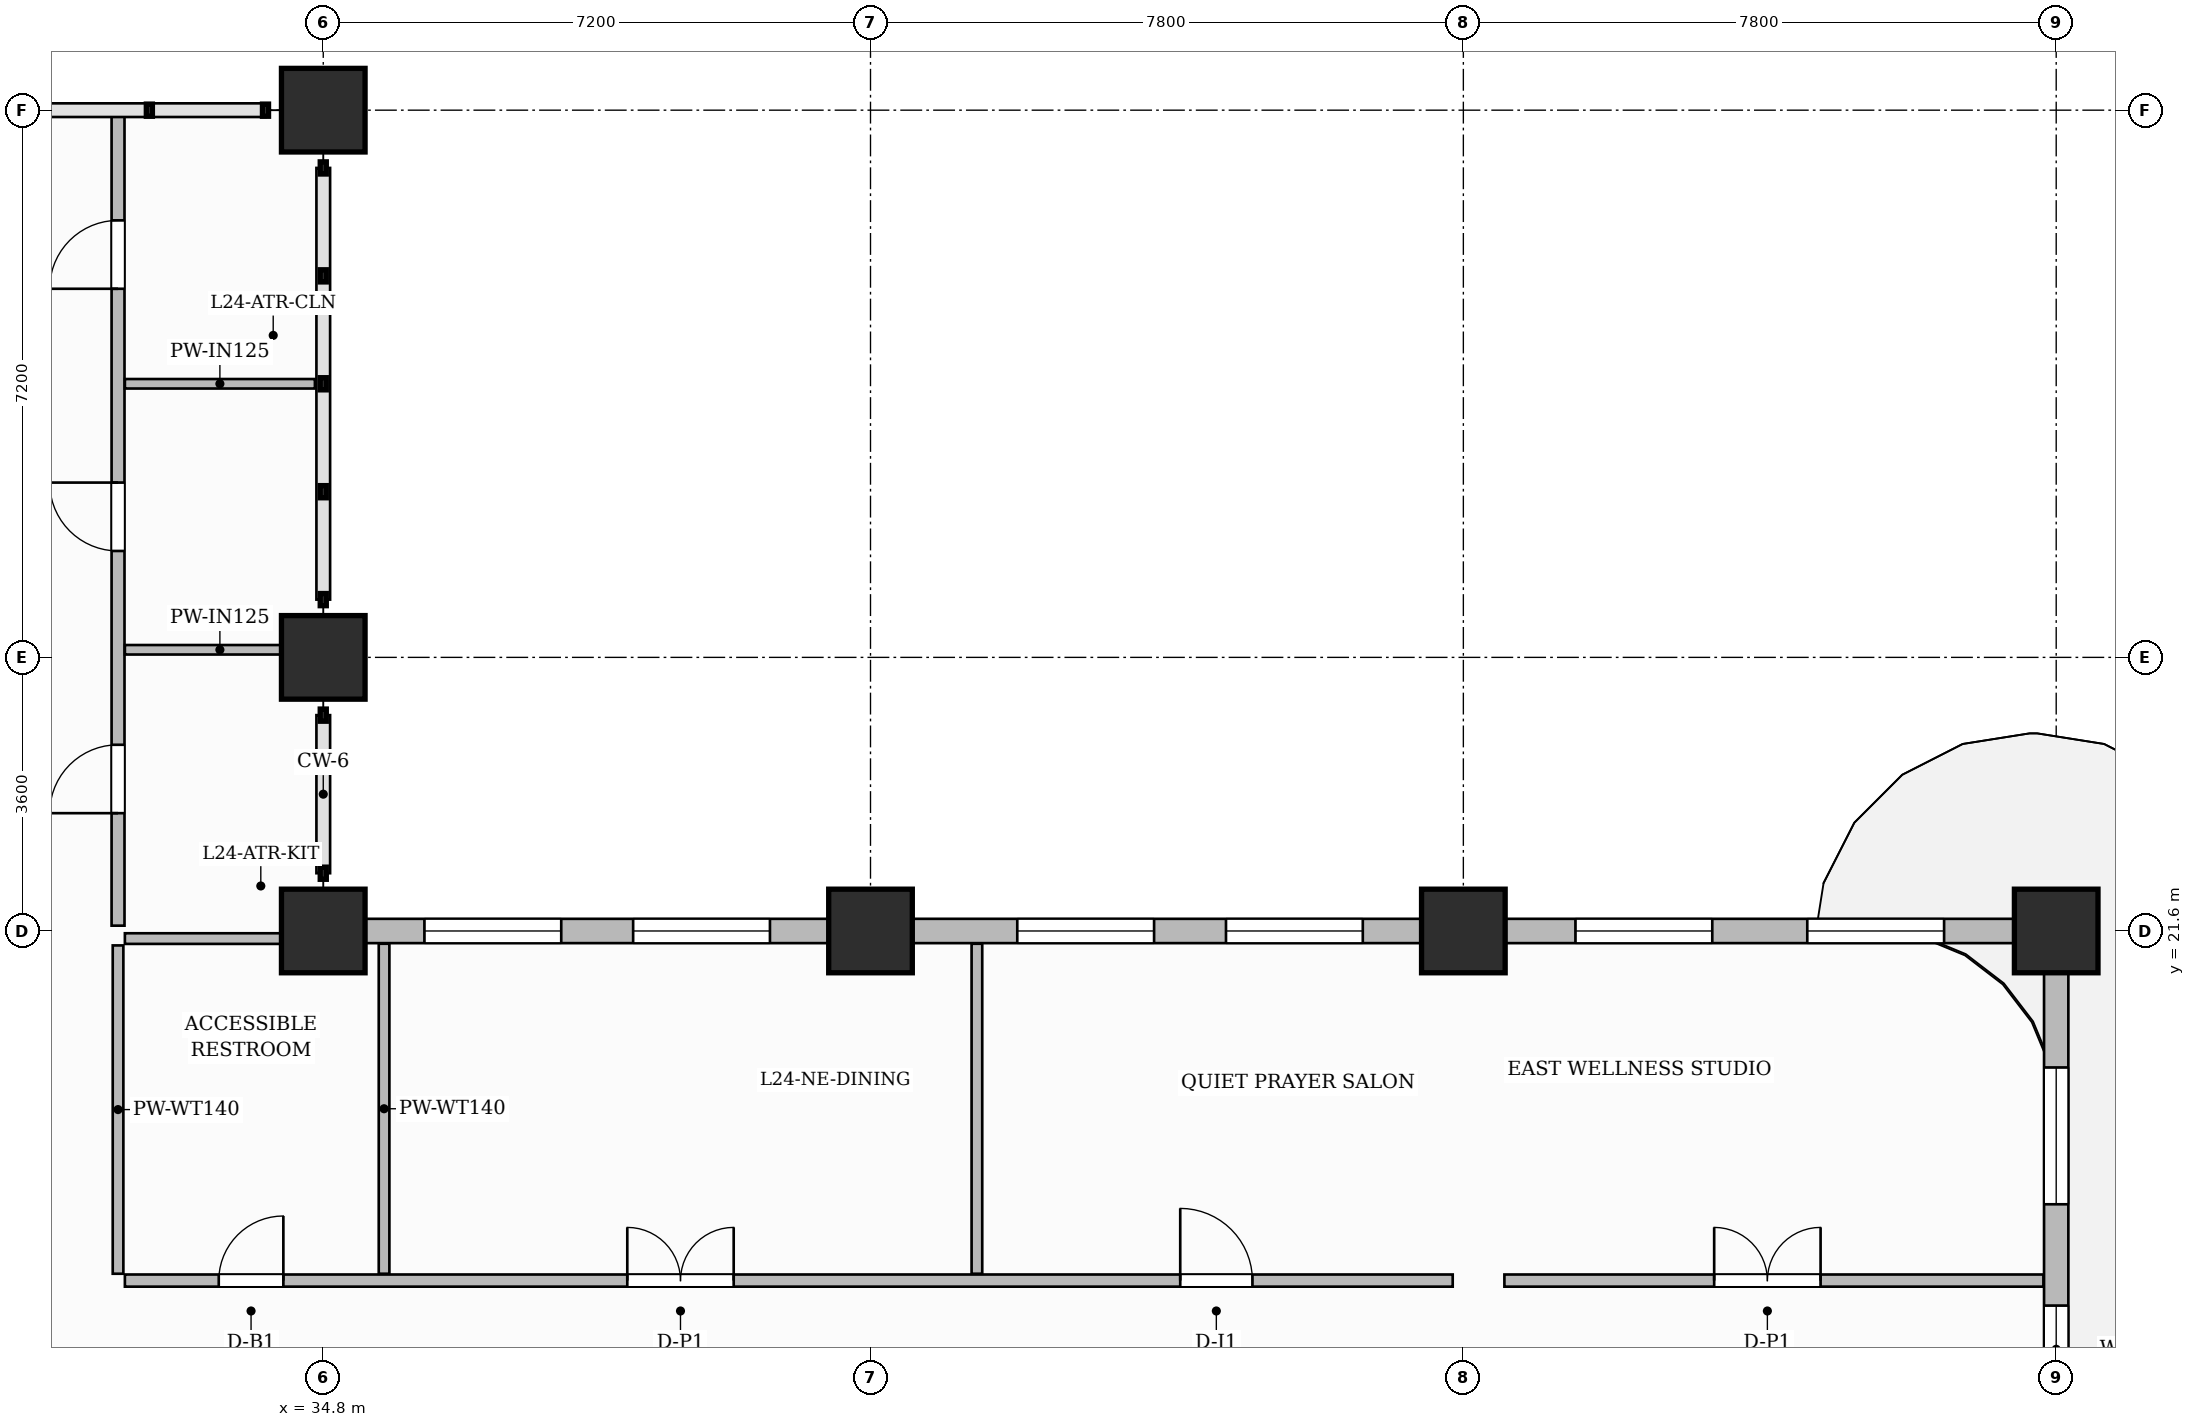
"""IFC4 building model, lengths in metres.
Left out: names, types, materials, properties, quantities, classifications, styles, units other than length and angle.
Written with IfcOpenShell. Run it as: python <this file> out.ifc"""

import sys

from ifc_helpers import new_model, si_unit, direction, frame, frame_2d, origin, origin_2d, place, context, subcontext, project, spatial, rectangle, extrude, source, transform, mapped, element, fill, save


model = new_model("IFC4")
c1 = context("Model", 3, precision=1e-05, world=origin(), true_north=direction((0.0, 1.0)))
c2 = subcontext(c1, "Body", "Model", "MODEL_VIEW")
j1 = project(units=[si_unit("LENGTHUNIT", "METRE"), si_unit("PLANEANGLEUNIT", "RADIAN")], contexts=[c1])
p1 = place(None, origin())
s1 = spatial("IfcSite", under=j1, at=p1, CompositionType="ELEMENT")
p2 = place(p1, origin())
s2 = spatial("IfcBuilding", under=s1, at=p2, CompositionType="ELEMENT")
p3 = place(p2, frame((0.0, 0.0, 99.0)))
s3 = spatial("IfcBuildingStorey", under=s2, at=p3, CompositionType="ELEMENT", Elevation=99.0)
m1 = source(origin(), c2, "Body", "SweptSolid", [
    extrude(rectangle(XDim=1.1, YDim=1.1, at=origin_2d()), origin(), (0.0, 0.0, 1.0), 3.7),
])
for number, where, z_axis, x_axis in (
    (1, (34.8, 21.6, 0.0), (0.0, 0.0, 1.0), (1.0, 0.0, 0.0)),
    (2, (34.8, 25.2, 0.0), (0.0, 0.0, 1.0), (1.0, 0.0, 0.0)),
    (3, (34.8, 32.4, 0.0), (0.0, 0.0, 1.0), (1.0, 0.0, 0.0)),
    (4, (42.0, 21.6, 0.0), (0.0, 0.0, 1.0), (1.0, 0.0, 0.0)),
    (5, (49.8, 21.6, 0.0), (0.0, 0.0, 1.0), (1.0, 0.0, 0.0)),
    (6, (57.6, 21.6, 0.0), (0.0, 0.0, 1.0), (1.0, 0.0, 0.0)),
):
    element("IfcColumn", number, at=place(p3, frame(where, z_axis=z_axis, x_axis=x_axis)), inside=s3, PredefinedType="COLUMN", context=c2, shape_type="MappedRepresentation", body=[
        mapped(m1, transform((0.0, 0.0, 0.0), scale=1.0)),
    ])
p4 = place(p3, frame((32.19, 17.0, 0.0), z_axis=(0.0, 0.0, 1.0), x_axis=(1.0, 0.0, 0.0)))
e7 = element("IfcWall", 7, at=p4, inside=s3, PredefinedType="PARTITIONING", context=c2, shape_type="SweptSolid", body=[
    extrude(rectangle(XDim=17.47, YDim=0.16, at=frame_2d((8.735, 0.0))), origin(), (0.0, 0.0, 1.0), 3.45),
])
p5 = place(p4, frame((1.235, 0.0, 0.0)))
e8 = element("IfcOpeningElement", 8, at=p5, cuts=e7, PredefinedType="OPENING", context=c2, shape_type="SweptSolid", body=[
    extrude(rectangle(XDim=0.85, YDim=2.1, at=frame_2d((0.425, 1.05))), frame((0.0, 0.09, 0.0), z_axis=(0.0, -1.0, 0.0), x_axis=(1.0, 0.0, 0.0)), (0.0, 0.0, 1.0), 0.18),
])
p6 = place(p4, frame((6.61, 0.0, 0.0)))
e9 = element("IfcOpeningElement", 9, at=p6, cuts=e7, PredefinedType="OPENING", context=c2, shape_type="SweptSolid", body=[
    extrude(rectangle(XDim=1.4, YDim=2.35, at=frame_2d((0.7, 1.175))), frame((0.0, 0.09, 0.0), z_axis=(0.0, -1.0, 0.0), x_axis=(1.0, 0.0, 0.0)), (0.0, 0.0, 1.0), 0.18),
])
p7 = place(p4, frame((13.885, 0.0, 0.0)))
e10 = element("IfcOpeningElement", 10, at=p7, cuts=e7, PredefinedType="OPENING", context=c2, shape_type="SweptSolid", body=[
    extrude(rectangle(XDim=0.95, YDim=2.15, at=frame_2d((0.475, 1.075))), frame((0.0, 0.09, 0.0), z_axis=(0.0, -1.0, 0.0), x_axis=(1.0, 0.0, 0.0)), (0.0, 0.0, 1.0), 0.18),
])
p8 = place(p3, frame((50.34, 17.0, 0.0), z_axis=(0.0, 0.0, 1.0), x_axis=(1.0, 0.0, 0.0)))
e11 = element("IfcWall", 11, at=p8, inside=s3, PredefinedType="PARTITIONING", context=c2, shape_type="SweptSolid", body=[
    extrude(rectangle(XDim=7.092, YDim=0.16, at=frame_2d((3.546, 0.0))), origin(), (0.0, 0.0, 1.0), 3.45),
])
p9 = place(p8, frame((2.76, 0.0, 0.0)))
e12 = element("IfcOpeningElement", 12, at=p9, cuts=e11, PredefinedType="OPENING", context=c2, shape_type="SweptSolid", body=[
    extrude(rectangle(XDim=1.4, YDim=2.35, at=frame_2d((0.7, 1.175))), frame((0.0, 0.09, 0.0), z_axis=(0.0, -1.0, 0.0), x_axis=(1.0, 0.0, 0.0)), (0.0, 0.0, 1.0), 0.18),
])
p10 = place(p3, frame((32.1, 17.09, 0.0), z_axis=(0.0, 0.0, 1.0), x_axis=(0.0, 1.0, 0.0)))
e13 = element("IfcWall", 13, at=p10, inside=s3, PredefinedType="PARTITIONING", context=c2, shape_type="SweptSolid", body=[
    extrude(rectangle(XDim=4.32, YDim=0.14, at=frame_2d((2.16, 0.0))), origin(), (0.0, 0.0, 1.0), 3.45),
])
for number, where, z_axis, x_axis in (
    (14, (35.6, 17.09, 0.0), (0.0, 0.0, 1.0), (0.0, 1.0, 0.0)),
    (15, (43.4, 17.09, 0.0), (0.0, 0.0, 1.0), (0.0, 1.0, 0.0)),
):
    element("IfcWall", number, at=place(p3, frame(where, z_axis=z_axis, x_axis=x_axis)), inside=s3, PredefinedType="PARTITIONING", context=c2, shape_type="SweptSolid", body=[
        extrude(rectangle(XDim=4.342, YDim=0.14, at=frame_2d((2.171, 0.0))), origin(), (0.0, 0.0, 1.0), 3.45),
    ])
p11 = place(p3, frame((32.19, 21.5, 0.0), z_axis=(0.0, 0.0, 1.0), x_axis=(1.0, 0.0, 0.0)))
e16 = element("IfcWall", 16, at=p11, inside=s3, PredefinedType="PARTITIONING", context=c2, shape_type="SweptSolid", body=[
    extrude(rectangle(XDim=2.42, YDim=0.14, at=frame_2d((1.21, 0.0))), origin(), (0.0, 0.0, 1.0), 2.885),
])
p12 = place(p3, frame((32.1, 21.67, 0.0), z_axis=(0.0, 0.0, 1.0), x_axis=(0.0, 1.0, 0.0)))
e17 = element("IfcWall", 17, at=p12, inside=s3, PredefinedType="PARTITIONING", context=c2, shape_type="SweptSolid", body=[
    extrude(rectangle(XDim=10.702, YDim=0.17, at=frame_2d((5.351, 0.0))), origin(), (0.0, 0.0, 1.0), 3.45),
])
p13 = place(p12, frame((1.48, 0.0, 0.0)))
e18 = element("IfcOpeningElement", 18, at=p13, cuts=e17, PredefinedType="OPENING", context=c2, shape_type="SweptSolid", body=[
    extrude(rectangle(XDim=0.9, YDim=2.15, at=frame_2d((0.45, 1.075))), frame((0.0, 0.095, 0.0), z_axis=(0.0, -1.0, 0.0), x_axis=(1.0, 0.0, 0.0)), (0.0, 0.0, 1.0), 0.19),
])
p14 = place(p12, frame((4.93, 0.0, 0.0)))
e19 = element("IfcOpeningElement", 19, at=p14, cuts=e17, PredefinedType="OPENING", context=c2, shape_type="SweptSolid", body=[
    extrude(rectangle(XDim=0.9, YDim=2.15, at=frame_2d((0.45, 1.075))), frame((0.0, 0.095, 0.0), z_axis=(0.0, -1.0, 0.0), x_axis=(1.0, 0.0, 0.0)), (0.0, 0.0, 1.0), 0.19),
])
p15 = place(p12, frame((8.38, 0.0, 0.0)))
e20 = element("IfcOpeningElement", 20, at=p15, cuts=e17, PredefinedType="OPENING", context=c2, shape_type="SweptSolid", body=[
    extrude(rectangle(XDim=0.9, YDim=2.15, at=frame_2d((0.45, 1.075))), frame((0.0, 0.095, 0.0), z_axis=(0.0, -1.0, 0.0), x_axis=(1.0, 0.0, 0.0)), (0.0, 0.0, 1.0), 0.19),
])
for number, where, z_axis, x_axis in (
    (21, (32.19, 25.3, 0.0), (0.0, 0.0, 1.0), (1.0, 0.0, 0.0)),
    (22, (32.19, 28.8, 0.0), (0.0, 0.0, 1.0), (1.0, 0.0, 0.0)),
):
    element("IfcWall", number, at=place(p3, frame(where, z_axis=z_axis, x_axis=x_axis)), inside=s3, PredefinedType="PARTITIONING", context=c2, shape_type="SweptSolid", body=[
        extrude(rectangle(XDim=2.5, YDim=0.125, at=frame_2d((1.25, 0.0))), origin(), (0.0, 0.0, 1.0), 3.45),
    ])
p16 = place(p3, frame((57.6, 0.05, 0.0), z_axis=(0.0, 0.0, 1.0), x_axis=(0.0, 1.0, 0.0)))
e23 = element("IfcWall", 23, at=p16, inside=s3, PredefinedType="SOLIDWALL", context=c2, shape_type="SweptSolid", body=[
    extrude(rectangle(XDim=21.5, YDim=0.32, at=frame_2d((10.75, 0.0))), origin(), (0.0, 0.0, 1.0), 2.885),
])
p17 = place(p16, frame((3.4, 0.0, 0.0)))
e24 = element("IfcOpeningElement", 24, at=p17, cuts=e23, PredefinedType="OPENING", context=c2, shape_type="SweptSolid", body=[
    extrude(rectangle(XDim=1.2, YDim=2.2, at=frame_2d((0.6, 1.1))), frame((0.0, 0.17, 0.0), z_axis=(0.0, -1.0, 0.0), x_axis=(1.0, 0.0, 0.0)), (0.0, 0.0, 1.0), 0.34),
])
p18 = place(p16, frame((1.225, 0.0, 0.8)))
e25 = element("IfcOpeningElement", 25, at=p18, cuts=e23, PredefinedType="OPENING", context=c2, shape_type="SweptSolid", body=[
    extrude(rectangle(XDim=1.4, YDim=1.85, at=frame_2d((0.7, 0.925))), frame((0.0, 0.17, 0.0), z_axis=(0.0, -1.0, 0.0), x_axis=(1.0, 0.0, 0.0)), (0.0, 0.0, 1.0), 0.34),
])
p19 = place(p16, frame((5.15, 0.0, 0.8)))
e26 = element("IfcOpeningElement", 26, at=p19, cuts=e23, PredefinedType="OPENING", context=c2, shape_type="SweptSolid", body=[
    extrude(rectangle(XDim=0.95, YDim=1.75, at=frame_2d((0.475, 0.875))), frame((0.0, 0.17, 0.0), z_axis=(0.0, -1.0, 0.0), x_axis=(1.0, 0.0, 0.0)), (0.0, 0.0, 1.0), 0.34),
])
p20 = place(p16, frame((8.475, 0.0, 0.8)))
e27 = element("IfcOpeningElement", 27, at=p20, cuts=e23, PredefinedType="OPENING", context=c2, shape_type="SweptSolid", body=[
    extrude(rectangle(XDim=1.8, YDim=1.85, at=frame_2d((0.9, 0.925))), frame((0.0, 0.17, 0.0), z_axis=(0.0, -1.0, 0.0), x_axis=(1.0, 0.0, 0.0)), (0.0, 0.0, 1.0), 0.34),
])
p21 = place(p16, frame((11.225, 0.0, 0.8)))
e28 = element("IfcOpeningElement", 28, at=p21, cuts=e23, PredefinedType="OPENING", context=c2, shape_type="SweptSolid", body=[
    extrude(rectangle(XDim=1.8, YDim=1.85, at=frame_2d((0.9, 0.925))), frame((0.0, 0.17, 0.0), z_axis=(0.0, -1.0, 0.0), x_axis=(1.0, 0.0, 0.0)), (0.0, 0.0, 1.0), 0.34),
])
p22 = place(p16, frame((15.471, 0.0, 0.8)))
e29 = element("IfcOpeningElement", 29, at=p22, cuts=e23, PredefinedType="OPENING", context=c2, shape_type="SweptSolid", body=[
    extrude(rectangle(XDim=1.15, YDim=1.8, at=frame_2d((0.575, 0.9))), frame((0.0, 0.17, 0.0), z_axis=(0.0, -1.0, 0.0), x_axis=(1.0, 0.0, 0.0)), (0.0, 0.0, 1.0), 0.34),
])
p23 = place(p16, frame((17.954, 0.0, 0.8)))
e30 = element("IfcOpeningElement", 30, at=p23, cuts=e23, PredefinedType="OPENING", context=c2, shape_type="SweptSolid", body=[
    extrude(rectangle(XDim=1.8, YDim=1.85, at=frame_2d((0.9, 0.925))), frame((0.0, 0.17, 0.0), z_axis=(0.0, -1.0, 0.0), x_axis=(1.0, 0.0, 0.0)), (0.0, 0.0, 1.0), 0.34),
])
p24 = place(p3, frame((34.8, 21.6, 0.0), z_axis=(0.0, 0.0, 1.0), x_axis=(1.0, 0.0, 0.0)))
e31 = element("IfcWall", 31, at=p24, inside=s3, PredefinedType="SOLIDWALL", context=c2, shape_type="SweptSolid", body=[
    extrude(rectangle(XDim=22.8, YDim=0.32, at=frame_2d((11.4, 0.0))), origin(), (0.0, 0.0, 1.0), 2.885),
])
p25 = place(p24, frame((1.331, 0.0, 0.8)))
e32 = element("IfcOpeningElement", 32, at=p25, cuts=e31, PredefinedType="OPENING", context=c2, shape_type="SweptSolid", body=[
    extrude(rectangle(XDim=1.8, YDim=1.85, at=frame_2d((0.9, 0.925))), frame((0.0, 0.17, 0.0), z_axis=(0.0, -1.0, 0.0), x_axis=(1.0, 0.0, 0.0)), (0.0, 0.0, 1.0), 0.34),
])
p26 = place(p24, frame((4.077, 0.0, 0.8)))
e33 = element("IfcOpeningElement", 33, at=p26, cuts=e31, PredefinedType="OPENING", context=c2, shape_type="SweptSolid", body=[
    extrude(rectangle(XDim=1.8, YDim=1.85, at=frame_2d((0.9, 0.925))), frame((0.0, 0.17, 0.0), z_axis=(0.0, -1.0, 0.0), x_axis=(1.0, 0.0, 0.0)), (0.0, 0.0, 1.0), 0.34),
])
p27 = place(p24, frame((9.131, 0.0, 0.8)))
e34 = element("IfcOpeningElement", 34, at=p27, cuts=e31, PredefinedType="OPENING", context=c2, shape_type="SweptSolid", body=[
    extrude(rectangle(XDim=1.8, YDim=1.85, at=frame_2d((0.9, 0.925))), frame((0.0, 0.17, 0.0), z_axis=(0.0, -1.0, 0.0), x_axis=(1.0, 0.0, 0.0)), (0.0, 0.0, 1.0), 0.34),
])
p28 = place(p24, frame((11.877, 0.0, 0.8)))
e35 = element("IfcOpeningElement", 35, at=p28, cuts=e31, PredefinedType="OPENING", context=c2, shape_type="SweptSolid", body=[
    extrude(rectangle(XDim=1.8, YDim=1.85, at=frame_2d((0.9, 0.925))), frame((0.0, 0.17, 0.0), z_axis=(0.0, -1.0, 0.0), x_axis=(1.0, 0.0, 0.0)), (0.0, 0.0, 1.0), 0.34),
])
p29 = place(p24, frame((16.475, 0.0, 0.8)))
e36 = element("IfcOpeningElement", 36, at=p29, cuts=e31, PredefinedType="OPENING", context=c2, shape_type="SweptSolid", body=[
    extrude(rectangle(XDim=1.8, YDim=1.85, at=frame_2d((0.9, 0.925))), frame((0.0, 0.17, 0.0), z_axis=(0.0, -1.0, 0.0), x_axis=(1.0, 0.0, 0.0)), (0.0, 0.0, 1.0), 0.34),
])
p30 = place(p24, frame((19.525, 0.0, 0.8)))
e37 = element("IfcOpeningElement", 37, at=p30, cuts=e31, PredefinedType="OPENING", context=c2, shape_type="SweptSolid", body=[
    extrude(rectangle(XDim=1.8, YDim=1.85, at=frame_2d((0.9, 0.925))), frame((0.0, 0.17, 0.0), z_axis=(0.0, -1.0, 0.0), x_axis=(1.0, 0.0, 0.0)), (0.0, 0.0, 1.0), 0.34),
])
m2 = source(origin(), c2, "Body", "SweptSolid", [
    extrude(rectangle(XDim=1.4, YDim=2.35, at=frame_2d((0.7, 1.175))), frame((0.0, 0.025, 0.0), z_axis=(0.0, -1.0, 0.0), x_axis=(1.0, 0.0, 0.0)), (0.0, 0.0, 1.0), 0.05),
])
p31 = place(p9, origin())
e38 = element("IfcDoor", 38, at=p31, inside=s3, OperationType="DOUBLE_DOOR_SINGLE_SWING", PredefinedType="DOOR", context=c2, shape_type="MappedRepresentation", body=[
    mapped(m2, transform((0.0, 0.0, 0.0), scale=1.0)),
])
fill(e12, e38)
m3 = source(origin(), c2, "Body", "SweptSolid", [
    extrude(rectangle(XDim=0.85, YDim=2.1, at=frame_2d((0.425, 1.05))), frame((0.0, 0.025, 0.0), z_axis=(0.0, -1.0, 0.0), x_axis=(1.0, 0.0, 0.0)), (0.0, 0.0, 1.0), 0.05),
])
p32 = place(p5, origin())
e39 = element("IfcDoor", 39, at=p32, inside=s3, OperationType="SINGLE_SWING_RIGHT", PredefinedType="DOOR", context=c2, shape_type="MappedRepresentation", body=[
    mapped(m3, transform((0.0, 0.0, 0.0), scale=1.0)),
])
fill(e8, e39)
p33 = place(p6, origin())
e40 = element("IfcDoor", 40, at=p33, inside=s3, OperationType="DOUBLE_DOOR_SINGLE_SWING", PredefinedType="DOOR", context=c2, shape_type="MappedRepresentation", body=[
    mapped(m2, transform((0.0, 0.0, 0.0), scale=1.0)),
])
fill(e9, e40)
m4 = source(origin(), c2, "Body", "SweptSolid", [
    extrude(rectangle(XDim=0.95, YDim=2.15, at=frame_2d((0.475, 1.075))), frame((0.0, 0.025, 0.0), z_axis=(0.0, -1.0, 0.0), x_axis=(1.0, 0.0, 0.0)), (0.0, 0.0, 1.0), 0.05),
])
p34 = place(p7, origin())
e41 = element("IfcDoor", 41, at=p34, inside=s3, OperationType="SINGLE_SWING_LEFT", PredefinedType="DOOR", context=c2, shape_type="MappedRepresentation", body=[
    mapped(m4, transform((0.0, 0.0, 0.0), scale=1.0)),
])
fill(e10, e41)
m5 = source(origin(), c2, "Body", "SweptSolid", [
    extrude(rectangle(XDim=0.9, YDim=2.15, at=frame_2d((0.45, 1.075))), frame((0.0, 0.025, 0.0), z_axis=(0.0, -1.0, 0.0), x_axis=(1.0, 0.0, 0.0)), (0.0, 0.0, 1.0), 0.05),
])
p35 = place(p13, origin())
e42 = element("IfcDoor", 42, at=p35, inside=s3, OperationType="SINGLE_SWING_LEFT", PredefinedType="DOOR", context=c2, shape_type="MappedRepresentation", body=[
    mapped(m5, transform((0.0, 0.0, 0.0), scale=1.0)),
])
fill(e18, e42)
p36 = place(p14, origin())
e43 = element("IfcDoor", 43, at=p36, inside=s3, OperationType="SINGLE_SWING_RIGHT", PredefinedType="DOOR", context=c2, shape_type="MappedRepresentation", body=[
    mapped(m5, transform((0.0, 0.0, 0.0), scale=1.0)),
])
fill(e19, e43)
p37 = place(p15, origin())
e44 = element("IfcDoor", 44, at=p37, inside=s3, OperationType="SINGLE_SWING_LEFT", PredefinedType="DOOR", context=c2, shape_type="MappedRepresentation", body=[
    mapped(m5, transform((0.0, 0.0, 0.0), scale=1.0)),
])
fill(e20, e44)
m6 = source(origin(), c2, "Body", "SweptSolid", [
    extrude(rectangle(XDim=1.15, YDim=1.8, at=frame_2d((0.575, 0.9))), frame((0.0, 0.03, 0.0), z_axis=(0.0, -1.0, 0.0), x_axis=(1.0, 0.0, 0.0)), (0.0, 0.0, 1.0), 0.06),
])
p38 = place(p22, origin())
e45 = element("IfcWindow", 45, at=p38, inside=s3, PartitioningType="SINGLE_PANEL", PredefinedType="WINDOW", context=c2, shape_type="MappedRepresentation", body=[
    mapped(m6, transform((0.0, 0.0, 0.0), scale=1.0)),
])
fill(e29, e45)
m7 = source(origin(), c2, "Body", "SweptSolid", [
    extrude(rectangle(XDim=1.8, YDim=1.85, at=frame_2d((0.9, 0.925))), frame((0.0, 0.03, 0.0), z_axis=(0.0, -1.0, 0.0), x_axis=(1.0, 0.0, 0.0)), (0.0, 0.0, 1.0), 0.06),
])
p39 = place(p23, origin())
e46 = element("IfcWindow", 46, at=p39, inside=s3, PartitioningType="DOUBLE_PANEL_VERTICAL", PredefinedType="WINDOW", context=c2, shape_type="MappedRepresentation", body=[
    mapped(m7, transform((0.0, 0.0, 0.0), scale=1.0)),
])
fill(e30, e46)
p40 = place(p25, origin())
e47 = element("IfcWindow", 47, at=p40, inside=s3, PartitioningType="DOUBLE_PANEL_VERTICAL", PredefinedType="WINDOW", context=c2, shape_type="MappedRepresentation", body=[
    mapped(m7, transform((0.0, 0.0, 0.0), scale=1.0)),
])
fill(e32, e47)
p41 = place(p26, origin())
e48 = element("IfcWindow", 48, at=p41, inside=s3, PartitioningType="DOUBLE_PANEL_VERTICAL", PredefinedType="WINDOW", context=c2, shape_type="MappedRepresentation", body=[
    mapped(m7, transform((0.0, 0.0, 0.0), scale=1.0)),
])
fill(e33, e48)
p42 = place(p27, origin())
e49 = element("IfcWindow", 49, at=p42, inside=s3, PartitioningType="DOUBLE_PANEL_VERTICAL", PredefinedType="WINDOW", context=c2, shape_type="MappedRepresentation", body=[
    mapped(m7, transform((0.0, 0.0, 0.0), scale=1.0)),
])
fill(e34, e49)
p43 = place(p28, origin())
e50 = element("IfcWindow", 50, at=p43, inside=s3, PartitioningType="DOUBLE_PANEL_VERTICAL", PredefinedType="WINDOW", context=c2, shape_type="MappedRepresentation", body=[
    mapped(m7, transform((0.0, 0.0, 0.0), scale=1.0)),
])
fill(e35, e50)
p44 = place(p29, origin())
e51 = element("IfcWindow", 51, at=p44, inside=s3, PartitioningType="DOUBLE_PANEL_VERTICAL", PredefinedType="WINDOW", context=c2, shape_type="MappedRepresentation", body=[
    mapped(m7, transform((0.0, 0.0, 0.0), scale=1.0)),
])
fill(e36, e51)
p45 = place(p30, origin())
e52 = element("IfcWindow", 52, at=p45, inside=s3, PartitioningType="DOUBLE_PANEL_VERTICAL", PredefinedType="WINDOW", context=c2, shape_type="MappedRepresentation", body=[
    mapped(m7, transform((0.0, 0.0, 0.0), scale=1.0)),
])
fill(e37, e52)
save(model, sys.argv[1])
